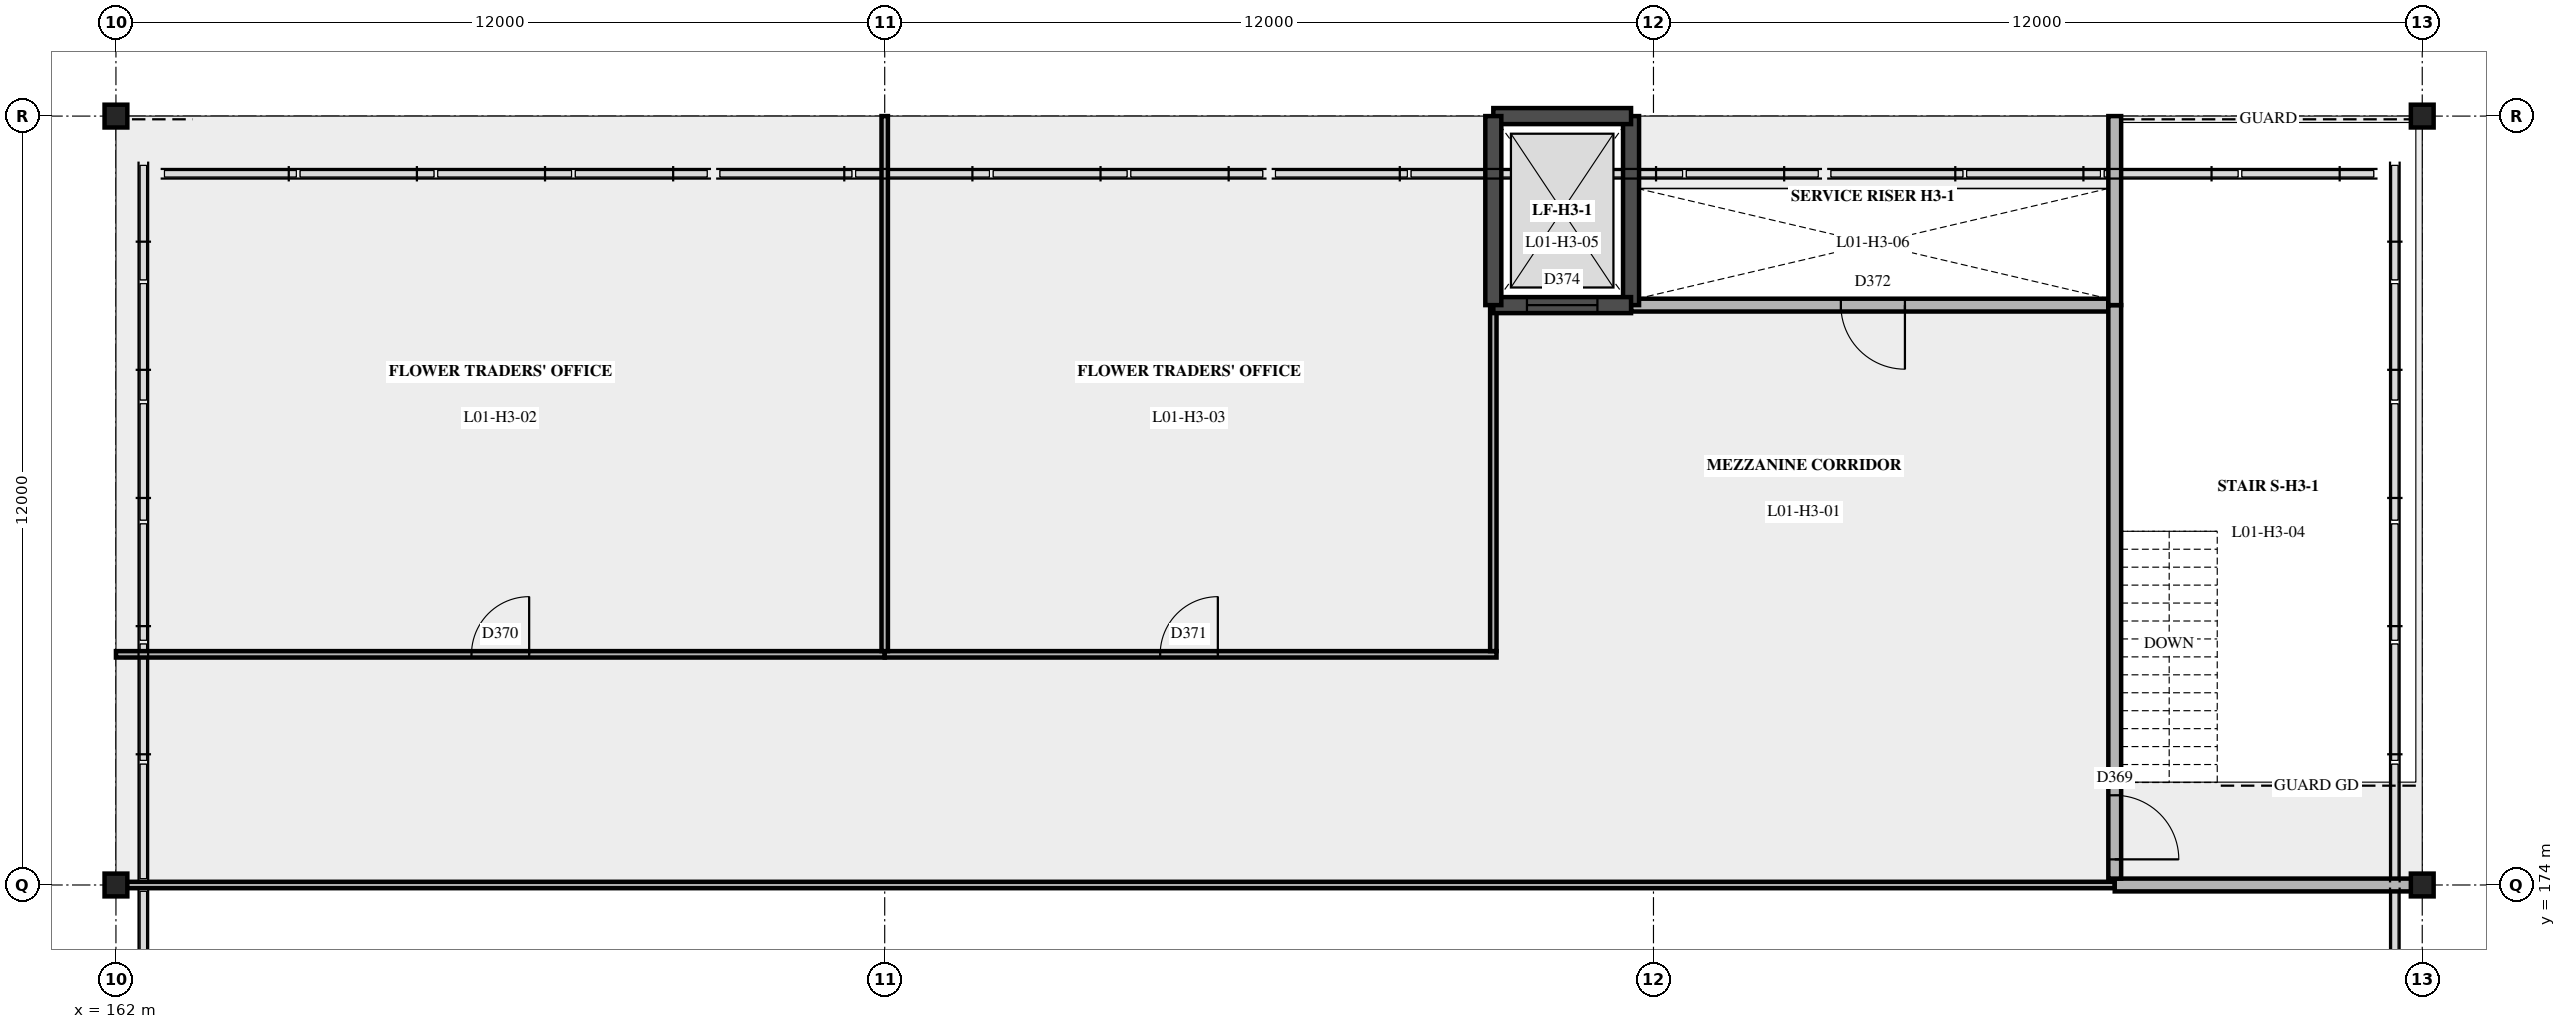
"""IFC4 building model, lengths in metres.
Left out: names, types, materials, properties, quantities, classifications, styles, units other than length and angle.
Written with IfcOpenShell. Run it as: python <this file> out.ifc"""

import sys

from ifc_helpers import new_model, si_unit, direction, frame, frame_2d, origin, origin_2d, place, context, subcontext, project, spatial, rectangle, hollow_circle, extrude, element, fill, save


model = new_model("IFC4")
c1 = context("Model", 3, precision=1e-05, world=origin(), true_north=direction((0.0, 1.0)))
c2 = subcontext(c1, "Body", "Model", "MODEL_VIEW")
j1 = project(units=[si_unit("LENGTHUNIT", "METRE"), si_unit("PLANEANGLEUNIT", "RADIAN")], contexts=[c1])
p1 = place(None, origin())
s1 = spatial("IfcSite", under=j1, at=p1, CompositionType="ELEMENT")
p2 = place(p1, origin())
s2 = spatial("IfcBuilding", under=s1, at=p2, CompositionType="ELEMENT")
p3 = place(p2, frame((0.0, 0.0, 5.4)))
s3 = spatial("IfcBuildingStorey", under=s2, at=p3, CompositionType="ELEMENT", Elevation=5.4)
for number, where, z_axis, x_axis in (
    (1, (162.0, 174.0, 0.0), (0.0, 0.0, 1.0), (1.0, 0.0, 0.0)),
    (2, (162.0, 186.0, 0.0), (0.0, 0.0, 1.0), (1.0, 0.0, 0.0)),
    (3, (198.0, 174.0, 0.0), (0.0, 0.0, 1.0), (1.0, 0.0, 0.0)),
    (4, (198.0, 186.0, 0.0), (0.0, 0.0, 1.0), (1.0, 0.0, 0.0)),
):
    element("IfcColumn", number, at=place(p3, frame(where, z_axis=z_axis, x_axis=x_axis)), inside=s3, PredefinedType="COLUMN", context=c2, shape_type="SweptSolid", body=[
        extrude(hollow_circle(Radius=0.178, WallThickness=0.012, at=origin_2d()), origin(), (0.0, 0.0, 1.0), 5.4),
    ])
p4 = place(p3, frame((162.0, 174.0, 0.0), z_axis=(0.0, 0.0, 1.0), x_axis=(1.0, 0.0, 0.0)))
e5 = element("IfcWall", 5, at=p4, inside=s3, PredefinedType="PARTITIONING", context=c2, shape_type="SweptSolid", body=[
    extrude(rectangle(XDim=31.2, YDim=0.1, at=frame_2d((15.6, 0.0))), origin(), (0.0, 0.0, 1.0), 2.6),
])
p5 = place(p3, frame((193.2, 174.0, 0.0), z_axis=(0.0, 0.0, 1.0), x_axis=(1.0, 0.0, 0.0)))
e6 = element("IfcWall", 6, at=p5, inside=s3, PredefinedType="PARTITIONING", context=c2, shape_type="SweptSolid", body=[
    extrude(rectangle(XDim=4.8, YDim=0.2, at=frame_2d((2.4, 0.0))), origin(), (0.0, 0.0, 1.0), 2.6),
])
p6 = place(p3, frame((162.0, 177.6, 0.0), z_axis=(0.0, 0.0, 1.0), x_axis=(1.0, 0.0, 0.0)))
e7 = element("IfcWall", 7, at=p6, inside=s3, PredefinedType="PARTITIONING", context=c2, shape_type="SweptSolid", body=[
    extrude(rectangle(XDim=12.0, YDim=0.1, at=frame_2d((6.0, 0.0))), origin(), (0.0, 0.0, 1.0), 2.6),
])
p7 = place(p6, frame((5.55, 0.0, 0.0)))
e8 = element("IfcOpeningElement", 8, at=p7, cuts=e7, PredefinedType="OPENING", context=c2, shape_type="SweptSolid", body=[
    extrude(rectangle(XDim=0.9, YDim=2.1, at=frame_2d((0.45, 1.05))), frame((0.0, 0.06, 0.0), z_axis=(0.0, -1.0, 0.0), x_axis=(1.0, 0.0, 0.0)), (0.0, 0.0, 1.0), 0.12),
])
p8 = place(p3, frame((174.0, 177.6, 0.0), z_axis=(0.0, 0.0, 1.0), x_axis=(1.0, 0.0, 0.0)))
e9 = element("IfcWall", 9, at=p8, inside=s3, PredefinedType="PARTITIONING", context=c2, shape_type="SweptSolid", body=[
    extrude(rectangle(XDim=9.55, YDim=0.1, at=frame_2d((4.775, 0.0))), origin(), (0.0, 0.0, 1.0), 2.6),
])
p9 = place(p8, frame((4.3, 0.0, 0.0)))
e10 = element("IfcOpeningElement", 10, at=p9, cuts=e9, PredefinedType="OPENING", context=c2, shape_type="SweptSolid", body=[
    extrude(rectangle(XDim=0.9, YDim=2.1, at=frame_2d((0.45, 1.05))), frame((0.0, 0.06, 0.0), z_axis=(0.0, -1.0, 0.0), x_axis=(1.0, 0.0, 0.0)), (0.0, 0.0, 1.0), 0.12),
])
p10 = place(p3, frame((185.65, 183.05, 0.0), z_axis=(0.0, 0.0, 1.0), x_axis=(1.0, 0.0, 0.0)))
e11 = element("IfcWall", 11, at=p10, inside=s3, PredefinedType="PARTITIONING", context=c2, shape_type="SweptSolid", body=[
    extrude(rectangle(XDim=7.45, YDim=0.2, at=frame_2d((3.725, 0.0))), origin(), (0.0, 0.0, 1.0), 2.6),
])
p11 = place(p10, frame((3.275, 0.0, 0.0)))
e12 = element("IfcOpeningElement", 12, at=p11, cuts=e11, PredefinedType="OPENING", context=c2, shape_type="SweptSolid", body=[
    extrude(rectangle(XDim=1.0, YDim=2.1, at=frame_2d((0.5, 1.05))), frame((0.0, 0.11, 0.0), z_axis=(0.0, -1.0, 0.0), x_axis=(1.0, 0.0, 0.0)), (0.0, 0.0, 1.0), 0.22),
])
p12 = place(p3, frame((174.0, 177.65, 0.0), z_axis=(0.0, 0.0, 1.0), x_axis=(0.0, 1.0, 0.0)))
e13 = element("IfcWall", 13, at=p12, inside=s3, PredefinedType="PARTITIONING", context=c2, shape_type="SweptSolid", body=[
    extrude(rectangle(XDim=8.35, YDim=0.1, at=frame_2d((4.175, 0.0))), origin(), (0.0, 0.0, 1.0), 2.6),
])
p13 = place(p3, frame((183.5, 177.65, 0.0), z_axis=(0.0, 0.0, 1.0), x_axis=(0.0, 1.0, 0.0)))
e14 = element("IfcWall", 14, at=p13, inside=s3, PredefinedType="PARTITIONING", context=c2, shape_type="SweptSolid", body=[
    extrude(rectangle(XDim=5.4, YDim=0.1, at=frame_2d((2.7, 0.0))), origin(), (0.0, 0.0, 1.0), 2.6),
])
p14 = place(p3, frame((193.2, 174.1, 0.0), z_axis=(0.0, 0.0, 1.0), x_axis=(0.0, 1.0, 0.0)))
e15 = element("IfcWall", 15, at=p14, inside=s3, PredefinedType="PARTITIONING", context=c2, shape_type="SweptSolid", body=[
    extrude(rectangle(XDim=8.95, YDim=0.2, at=frame_2d((4.475, 0.0))), origin(), (0.0, 0.0, 1.0), 2.6),
])
p15 = place(p14, frame((0.3, 0.0, 0.0)))
e16 = element("IfcOpeningElement", 16, at=p15, cuts=e15, PredefinedType="OPENING", context=c2, shape_type="SweptSolid", body=[
    extrude(rectangle(XDim=1.0, YDim=2.1, at=frame_2d((0.5, 1.05))), frame((0.0, 0.11, 0.0), z_axis=(0.0, -1.0, 0.0), x_axis=(1.0, 0.0, 0.0)), (0.0, 0.0, 1.0), 0.22),
])
p16 = place(p3, frame((193.2, 183.05, 0.0), z_axis=(0.0, 0.0, 1.0), x_axis=(0.0, 1.0, 0.0)))
e17 = element("IfcWall", 17, at=p16, inside=s3, PredefinedType="PARTITIONING", context=c2, shape_type="SweptSolid", body=[
    extrude(rectangle(XDim=2.95, YDim=0.2, at=frame_2d((1.475, 0.0))), origin(), (0.0, 0.0, 1.0), 2.6),
])
p17 = place(p3, frame((185.65, 183.05, 0.0), z_axis=(0.0, 0.0, 1.0), x_axis=(0.0, 1.0, 0.0)))
e18 = element("IfcWall", 18, at=p17, inside=s3, PredefinedType="SHEAR", context=c2, shape_type="SweptSolid", body=[
    extrude(rectangle(XDim=2.95, YDim=0.25, at=frame_2d((1.475, 0.0))), origin(), (0.0, 0.0, 1.0), 4.2),
])
p18 = place(p3, frame((185.65, 186.0, 0.0), z_axis=(0.0, 0.0, 1.0), x_axis=(-1.0, 0.0, 0.0)))
e19 = element("IfcWall", 19, at=p18, inside=s3, PredefinedType="SHEAR", context=c2, shape_type="SweptSolid", body=[
    extrude(rectangle(XDim=2.15, YDim=0.25, at=frame_2d((1.075, 0.0))), origin(), (0.0, 0.0, 1.0), 4.2),
])
p19 = place(p3, frame((183.5, 183.05, 0.0), z_axis=(0.0, 0.0, 1.0), x_axis=(1.0, 0.0, 0.0)))
e20 = element("IfcWall", 20, at=p19, inside=s3, PredefinedType="SHEAR", context=c2, shape_type="SweptSolid", body=[
    extrude(rectangle(XDim=2.15, YDim=0.25, at=frame_2d((1.075, 0.0))), origin(), (0.0, 0.0, 1.0), 4.2),
])
p20 = place(p19, frame((0.525, 0.0, 0.0)))
e21 = element("IfcOpeningElement", 21, at=p20, cuts=e20, PredefinedType="OPENING", context=c2, shape_type="SweptSolid", body=[
    extrude(rectangle(XDim=1.1, YDim=2.1, at=frame_2d((0.55, 1.05))), frame((0.0, 0.135, 0.0), z_axis=(0.0, -1.0, 0.0), x_axis=(1.0, 0.0, 0.0)), (0.0, 0.0, 1.0), 0.27),
])
p21 = place(p3, frame((183.5, 186.0, 0.0), z_axis=(0.0, 0.0, 1.0), x_axis=(0.0, -1.0, 0.0)))
e22 = element("IfcWall", 22, at=p21, inside=s3, PredefinedType="SHEAR", context=c2, shape_type="SweptSolid", body=[
    extrude(rectangle(XDim=2.95, YDim=0.25, at=frame_2d((1.475, 0.0))), origin(), (0.0, 0.0, 1.0), 4.2),
])
p22 = place(p15, origin())
e23 = element("IfcDoor", 23, at=p22, inside=s3, OperationType="SINGLE_SWING_RIGHT", PredefinedType="DOOR", context=c2, shape_type="SweptSolid", body=[
    extrude(rectangle(XDim=1.0, YDim=2.1, at=frame_2d((0.5, 1.05))), frame((0.0, 0.025, 0.0), z_axis=(0.0, -1.0, 0.0), x_axis=(1.0, 0.0, 0.0)), (0.0, 0.0, 1.0), 0.05),
])
fill(e16, e23)
p23 = place(p7, origin())
e24 = element("IfcDoor", 24, at=p23, inside=s3, OperationType="SINGLE_SWING_RIGHT", PredefinedType="DOOR", context=c2, shape_type="SweptSolid", body=[
    extrude(rectangle(XDim=0.9, YDim=2.1, at=frame_2d((0.45, 1.05))), frame((0.0, 0.025, 0.0), z_axis=(0.0, -1.0, 0.0), x_axis=(1.0, 0.0, 0.0)), (0.0, 0.0, 1.0), 0.05),
])
fill(e8, e24)
p24 = place(p9, origin())
e25 = element("IfcDoor", 25, at=p24, inside=s3, OperationType="SINGLE_SWING_RIGHT", PredefinedType="DOOR", context=c2, shape_type="SweptSolid", body=[
    extrude(rectangle(XDim=0.9, YDim=2.1, at=frame_2d((0.45, 1.05))), frame((0.0, 0.025, 0.0), z_axis=(0.0, -1.0, 0.0), x_axis=(1.0, 0.0, 0.0)), (0.0, 0.0, 1.0), 0.05),
])
fill(e10, e25)
p25 = place(p11, origin())
e26 = element("IfcDoor", 26, at=p25, inside=s3, OperationType="SINGLE_SWING_LEFT", PredefinedType="DOOR", context=c2, shape_type="SweptSolid", body=[
    extrude(rectangle(XDim=1.0, YDim=2.1, at=frame_2d((0.5, 1.05))), frame((0.0, 0.025, 0.0), z_axis=(0.0, -1.0, 0.0), x_axis=(1.0, 0.0, 0.0)), (0.0, 0.0, 1.0), 0.05),
])
fill(e12, e26)
p26 = place(p20, origin())
e27 = element("IfcDoor", 27, at=p26, inside=s3, OperationType="SLIDING_TO_LEFT", PredefinedType="DOOR", context=c2, shape_type="SweptSolid", body=[
    extrude(rectangle(XDim=1.1, YDim=2.1, at=frame_2d((0.55, 1.05))), frame((0.0, 0.025, 0.0), z_axis=(0.0, -1.0, 0.0), x_axis=(1.0, 0.0, 0.0)), (0.0, 0.0, 1.0), 0.05),
])
fill(e21, e27)
save(model, sys.argv[1])
